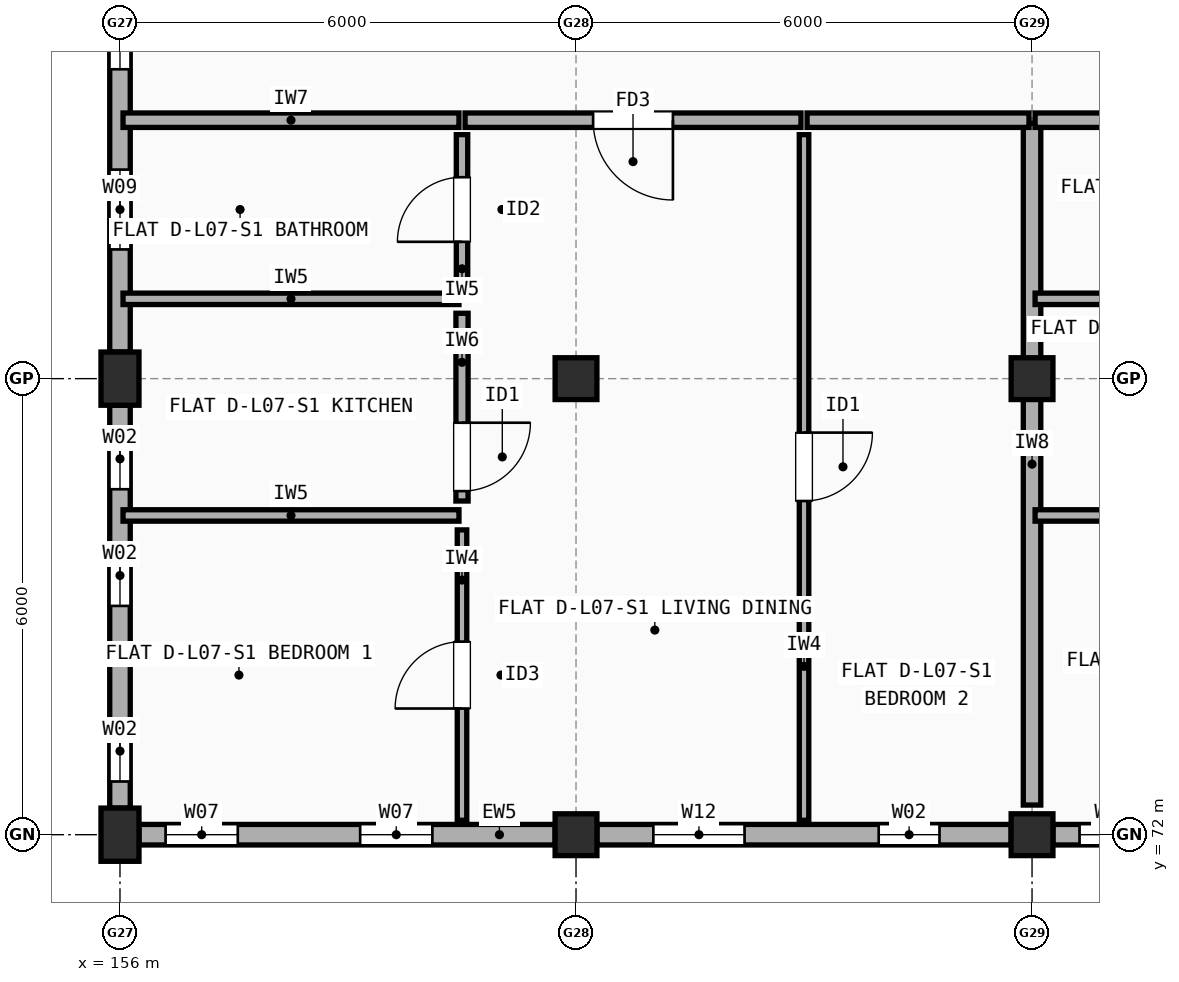
"""IFC4 building model, lengths in metres.
Left out: names, types, materials, properties, quantities, classifications, styles, units other than length and angle.
Written with IfcOpenShell. Run it as: python <this file> out.ifc"""

import sys

from ifc_helpers import new_model, si_unit, direction, frame, frame_2d, origin, origin_2d, place, context, subcontext, project, spatial, rectangle, extrude, element, fill, save


model = new_model("IFC4")
c1 = context("Model", 3, precision=1e-05, world=origin(), true_north=direction((0.0, 1.0)))
c2 = subcontext(c1, "Body", "Model", "MODEL_VIEW")
j1 = project(units=[si_unit("LENGTHUNIT", "METRE"), si_unit("PLANEANGLEUNIT", "RADIAN")], contexts=[c1])
p1 = place(None, origin())
s1 = spatial("IfcSite", under=j1, at=p1, CompositionType="ELEMENT")
p2 = place(p1, origin())
s2 = spatial("IfcBuilding", under=s1, at=p2, CompositionType="ELEMENT")
p3 = place(p2, frame((0.0, 0.0, 23.7)))
s3 = spatial("IfcBuildingStorey", under=s2, at=p3, CompositionType="ELEMENT", Elevation=23.7)
for number, where, z_axis, x_axis in (
    (1, (156.0, 72.0, 0.0), (0.0, 0.0, 1.0), (1.0, 0.0, 0.0)),
    (2, (156.0, 78.0, 0.0), (0.0, 0.0, 1.0), (1.0, 0.0, 0.0)),
):
    element("IfcColumn", number, at=place(p3, frame(where, z_axis=z_axis, x_axis=x_axis)), inside=s3, PredefinedType="COLUMN", context=c2, shape_type="SweptSolid", body=[
        extrude(rectangle(XDim=0.5, YDim=0.7, at=origin_2d()), origin(), (0.0, 0.0, 1.0), 2.975),
    ])
for number, where, z_axis, x_axis in (
    (3, (162.0, 72.0, 0.0), (0.0, 0.0, 1.0), (1.0, 0.0, 0.0)),
    (4, (162.0, 78.0, 0.0), (0.0, 0.0, 1.0), (1.0, 0.0, 0.0)),
    (5, (168.0, 72.0, 0.0), (0.0, 0.0, 1.0), (1.0, 0.0, 0.0)),
    (6, (168.0, 78.0, 0.0), (0.0, 0.0, 1.0), (1.0, 0.0, 0.0)),
):
    element("IfcColumn", number, at=place(p3, frame(where, z_axis=z_axis, x_axis=x_axis)), inside=s3, PredefinedType="COLUMN", context=c2, shape_type="SweptSolid", body=[
        extrude(rectangle(XDim=0.55, YDim=0.55, at=origin_2d()), origin(), (0.0, 0.0, 1.0), 2.975),
    ])
p4 = place(p3, frame((156.25, 72.0, 0.0), z_axis=(0.0, 0.0, 1.0), x_axis=(1.0, 0.0, 0.0)))
e7 = element("IfcWall", 7, at=p4, inside=s3, PredefinedType="STANDARD", context=c2, shape_type="SweptSolid", body=[
    extrude(rectangle(XDim=5.475, YDim=0.27, at=frame_2d((2.738, 0.0))), origin(), (0.0, 0.0, 1.0), 2.457),
])
p5 = place(p4, frame((0.35, 0.0, 0.9)))
e8 = element("IfcOpeningElement", 8, at=p5, cuts=e7, PredefinedType="OPENING", context=c2, shape_type="SweptSolid", body=[
    extrude(rectangle(XDim=0.95, YDim=1.35, at=frame_2d((0.475, 0.675))), frame((0.0, 0.145, 0.0), z_axis=(0.0, -1.0, 0.0), x_axis=(1.0, 0.0, 0.0)), (0.0, 0.0, 1.0), 0.29),
])
p6 = place(p4, frame((2.91, 0.0, 0.9)))
e9 = element("IfcOpeningElement", 9, at=p6, cuts=e7, PredefinedType="OPENING", context=c2, shape_type="SweptSolid", body=[
    extrude(rectangle(XDim=0.95, YDim=1.35, at=frame_2d((0.475, 0.675))), frame((0.0, 0.145, 0.0), z_axis=(0.0, -1.0, 0.0), x_axis=(1.0, 0.0, 0.0)), (0.0, 0.0, 1.0), 0.29),
])
p7 = place(p3, frame((162.275, 72.0, 0.0), z_axis=(0.0, 0.0, 1.0), x_axis=(1.0, 0.0, 0.0)))
e10 = element("IfcWall", 10, at=p7, inside=s3, PredefinedType="STANDARD", context=c2, shape_type="SweptSolid", body=[
    extrude(rectangle(XDim=5.45, YDim=0.27, at=frame_2d((2.725, 0.0))), origin(), (0.0, 0.0, 1.0), 2.457),
])
p8 = place(p7, frame((0.742, 0.0, 0.9)))
e11 = element("IfcOpeningElement", 11, at=p8, cuts=e10, PredefinedType="OPENING", context=c2, shape_type="SweptSolid", body=[
    extrude(rectangle(XDim=1.2, YDim=1.35, at=frame_2d((0.6, 0.675))), frame((0.0, 0.145, 0.0), z_axis=(0.0, -1.0, 0.0), x_axis=(1.0, 0.0, 0.0)), (0.0, 0.0, 1.0), 0.29),
])
p9 = place(p7, frame((3.708, 0.0, 0.9)))
e12 = element("IfcOpeningElement", 12, at=p9, cuts=e10, PredefinedType="OPENING", context=c2, shape_type="SweptSolid", body=[
    extrude(rectangle(XDim=0.8, YDim=1.2, at=frame_2d((0.4, 0.6))), frame((0.0, 0.145, 0.0), z_axis=(0.0, -1.0, 0.0), x_axis=(1.0, 0.0, 0.0)), (0.0, 0.0, 1.0), 0.29),
])
p10 = place(p3, frame((168.275, 72.0, 0.0), z_axis=(0.0, 0.0, 1.0), x_axis=(1.0, 0.0, 0.0)))
e13 = element("IfcWall", 13, at=p10, inside=s3, PredefinedType="STANDARD", context=c2, shape_type="SweptSolid", body=[
    extrude(rectangle(XDim=5.45, YDim=0.27, at=frame_2d((2.725, 0.0))), origin(), (0.0, 0.0, 1.0), 2.457),
])
p11 = place(p10, frame((0.35, 0.0, 0.9)))
e14 = element("IfcOpeningElement", 14, at=p11, cuts=e13, PredefinedType="OPENING", context=c2, shape_type="SweptSolid", body=[
    extrude(rectangle(XDim=0.85, YDim=1.25, at=frame_2d((0.425, 0.625))), frame((0.0, 0.145, 0.0), z_axis=(0.0, -1.0, 0.0), x_axis=(1.0, 0.0, 0.0)), (0.0, 0.0, 1.0), 0.29),
])
p12 = place(p10, frame((2.985, 0.0, 0.9)))
e15 = element("IfcOpeningElement", 15, at=p12, cuts=e13, PredefinedType="OPENING", context=c2, shape_type="SweptSolid", body=[
    extrude(rectangle(XDim=0.85, YDim=1.25, at=frame_2d((0.425, 0.625))), frame((0.0, 0.145, 0.0), z_axis=(0.0, -1.0, 0.0), x_axis=(1.0, 0.0, 0.0)), (0.0, 0.0, 1.0), 0.29),
])
p13 = place(p3, frame((156.0, 83.65, 0.0), z_axis=(0.0, 0.0, 1.0), x_axis=(0.0, -1.0, 0.0)))
e16 = element("IfcWall", 16, at=p13, inside=s3, PredefinedType="STANDARD", context=c2, shape_type="SweptSolid", body=[
    extrude(rectangle(XDim=5.3, YDim=0.27, at=frame_2d((2.65, 0.0))), origin(), (0.0, 0.0, 1.0), 2.457),
])
p14 = place(p13, frame((0.63, 0.0, 0.9)))
e17 = element("IfcOpeningElement", 17, at=p14, cuts=e16, PredefinedType="OPENING", context=c2, shape_type="SweptSolid", body=[
    extrude(rectangle(XDim=0.95, YDim=1.35, at=frame_2d((0.475, 0.675))), frame((0.0, 0.145, 0.0), z_axis=(0.0, -1.0, 0.0), x_axis=(1.0, 0.0, 0.0)), (0.0, 0.0, 1.0), 0.29),
])
p15 = place(p13, frame((2.9, 0.0, 0.9)))
e18 = element("IfcOpeningElement", 18, at=p15, cuts=e16, PredefinedType="OPENING", context=c2, shape_type="SweptSolid", body=[
    extrude(rectangle(XDim=1.05, YDim=1.35, at=frame_2d((0.525, 0.675))), frame((0.0, 0.145, 0.0), z_axis=(0.0, -1.0, 0.0), x_axis=(1.0, 0.0, 0.0)), (0.0, 0.0, 1.0), 0.29),
])
p16 = place(p3, frame((156.0, 77.65, 0.0), z_axis=(0.0, 0.0, 1.0), x_axis=(0.0, -1.0, 0.0)))
e19 = element("IfcWall", 19, at=p16, inside=s3, PredefinedType="STANDARD", context=c2, shape_type="SweptSolid", body=[
    extrude(rectangle(XDim=5.3, YDim=0.27, at=frame_2d((2.65, 0.0))), origin(), (0.0, 0.0, 1.0), 2.457),
])
p17 = place(p16, frame((0.305, 0.0, 0.9)))
e20 = element("IfcOpeningElement", 20, at=p17, cuts=e19, PredefinedType="OPENING", context=c2, shape_type="SweptSolid", body=[
    extrude(rectangle(XDim=0.8, YDim=1.2, at=frame_2d((0.4, 0.6))), frame((0.0, 0.145, 0.0), z_axis=(0.0, -1.0, 0.0), x_axis=(1.0, 0.0, 0.0)), (0.0, 0.0, 1.0), 0.29),
])
p18 = place(p16, frame((1.84, 0.0, 0.9)))
e21 = element("IfcOpeningElement", 21, at=p18, cuts=e19, PredefinedType="OPENING", context=c2, shape_type="SweptSolid", body=[
    extrude(rectangle(XDim=0.8, YDim=1.2, at=frame_2d((0.4, 0.6))), frame((0.0, 0.145, 0.0), z_axis=(0.0, -1.0, 0.0), x_axis=(1.0, 0.0, 0.0)), (0.0, 0.0, 1.0), 0.29),
])
p19 = place(p16, frame((4.15, 0.0, 0.9)))
e22 = element("IfcOpeningElement", 22, at=p19, cuts=e19, PredefinedType="OPENING", context=c2, shape_type="SweptSolid", body=[
    extrude(rectangle(XDim=0.8, YDim=1.2, at=frame_2d((0.4, 0.6))), frame((0.0, 0.145, 0.0), z_axis=(0.0, -1.0, 0.0), x_axis=(1.0, 0.0, 0.0)), (0.0, 0.0, 1.0), 0.29),
])
p20 = place(p3, frame((168.0, 72.39, 0.0), z_axis=(0.0, 0.0, 1.0), x_axis=(0.0, 1.0, 0.0)))
e23 = element("IfcWall", 23, at=p20, inside=s3, PredefinedType="SOLIDWALL", context=c2, shape_type="SweptSolid", body=[
    extrude(rectangle(XDim=8.97, YDim=0.23, at=frame_2d((4.485, 0.0))), origin(), (0.0, 0.0, 1.0), 2.508),
])
p21 = place(p3, frame((156.04, 81.4, 0.0), z_axis=(0.0, 0.0, 1.0), x_axis=(1.0, 0.0, 0.0)))
e24 = element("IfcWall", 24, at=p21, inside=s3, PredefinedType="SOLIDWALL", context=c2, shape_type="SweptSolid", body=[
    extrude(rectangle(XDim=4.42, YDim=0.19, at=frame_2d((2.21, 0.0))), origin(), (0.0, 0.0, 1.0), 2.457),
])
p22 = place(p3, frame((160.54, 81.4, 0.0), z_axis=(0.0, 0.0, 1.0), x_axis=(1.0, 0.0, 0.0)))
e25 = element("IfcWall", 25, at=p22, inside=s3, PredefinedType="SOLIDWALL", context=c2, shape_type="SweptSolid", body=[
    extrude(rectangle(XDim=4.42, YDim=0.19, at=frame_2d((2.21, 0.0))), origin(), (0.0, 0.0, 1.0), 2.508),
])
p23 = place(p22, frame((1.685, 0.0, 0.0)))
e26 = element("IfcOpeningElement", 26, at=p23, cuts=e25, PredefinedType="OPENING", context=c2, shape_type="SweptSolid", body=[
    extrude(rectangle(XDim=1.05, YDim=2.15, at=frame_2d((0.525, 1.075))), frame((0.0, 0.105, 0.0), z_axis=(0.0, -1.0, 0.0), x_axis=(1.0, 0.0, 0.0)), (0.0, 0.0, 1.0), 0.21),
])
p24 = place(p3, frame((160.5, 72.19, 0.0), z_axis=(0.0, 0.0, 1.0), x_axis=(0.0, 1.0, 0.0)))
e27 = element("IfcWall", 27, at=p24, inside=s3, PredefinedType="PARTITIONING", context=c2, shape_type="SweptSolid", body=[
    extrude(rectangle(XDim=3.82, YDim=0.125, at=frame_2d((1.91, 0.0))), origin(), (0.0, 0.0, 1.0), 2.975),
])
p25 = place(p24, frame((1.47, 0.0, 0.0)))
e28 = element("IfcOpeningElement", 28, at=p25, cuts=e27, PredefinedType="OPENING", context=c2, shape_type="SweptSolid", body=[
    extrude(rectangle(XDim=0.88, YDim=2.1, at=frame_2d((0.44, 1.05))), frame((0.0, 0.073, 0.0), z_axis=(0.0, -1.0, 0.0), x_axis=(1.0, 0.0, 0.0)), (0.0, 0.0, 1.0), 0.145),
])
p26 = place(p3, frame((160.5, 76.39, 0.0), z_axis=(0.0, 0.0, 1.0), x_axis=(0.0, 1.0, 0.0)))
e29 = element("IfcWall", 29, at=p26, inside=s3, PredefinedType="PLUMBINGWALL", context=c2, shape_type="SweptSolid", body=[
    extrude(rectangle(XDim=2.47, YDim=0.16, at=frame_2d((1.235, 0.0))), origin(), (0.0, 0.0, 1.0), 2.457),
])
p27 = place(p26, frame((0.13, 0.0, 0.0)))
e30 = element("IfcOpeningElement", 30, at=p27, cuts=e29, PredefinedType="OPENING", context=c2, shape_type="SweptSolid", body=[
    extrude(rectangle(XDim=0.9, YDim=2.1, at=frame_2d((0.45, 1.05))), frame((0.0, 0.09, 0.0), z_axis=(0.0, -1.0, 0.0), x_axis=(1.0, 0.0, 0.0)), (0.0, 0.0, 1.0), 0.18),
])
p28 = place(p3, frame((160.5, 79.24, 0.0), z_axis=(0.0, 0.0, 1.0), x_axis=(0.0, 1.0, 0.0)))
e31 = element("IfcWall", 31, at=p28, inside=s3, PredefinedType="PARTITIONING", context=c2, shape_type="SweptSolid", body=[
    extrude(rectangle(XDim=1.97, YDim=0.15, at=frame_2d((0.985, 0.0))), origin(), (0.0, 0.0, 1.0), 2.975),
])
p29 = place(p28, frame((0.56, 0.0, 0.0)))
e32 = element("IfcOpeningElement", 32, at=p29, cuts=e31, PredefinedType="OPENING", context=c2, shape_type="SweptSolid", body=[
    extrude(rectangle(XDim=0.85, YDim=2.1, at=frame_2d((0.425, 1.05))), frame((0.0, 0.085, 0.0), z_axis=(0.0, -1.0, 0.0), x_axis=(1.0, 0.0, 0.0)), (0.0, 0.0, 1.0), 0.17),
])
for number, where, z_axis, x_axis in (
    (33, (156.04, 76.2, 0.0), (0.0, 0.0, 1.0), (1.0, 0.0, 0.0)),
    (34, (156.04, 79.05, 0.0), (0.0, 0.0, 1.0), (1.0, 0.0, 0.0)),
):
    element("IfcWall", number, at=place(p3, frame(where, z_axis=z_axis, x_axis=x_axis)), inside=s3, PredefinedType="PARTITIONING", context=c2, shape_type="SweptSolid", body=[
        extrude(rectangle(XDim=4.42, YDim=0.15, at=frame_2d((2.21, 0.0))), origin(), (0.0, 0.0, 1.0), 2.457),
    ])
p30 = place(p3, frame((165.04, 81.4, 0.0), z_axis=(0.0, 0.0, 1.0), x_axis=(1.0, 0.0, 0.0)))
e35 = element("IfcWall", 35, at=p30, inside=s3, PredefinedType="SOLIDWALL", context=c2, shape_type="SweptSolid", body=[
    extrude(rectangle(XDim=2.92, YDim=0.19, at=frame_2d((1.46, 0.0))), origin(), (0.0, 0.0, 1.0), 2.508),
])
p31 = place(p3, frame((165.0, 72.19, 0.0), z_axis=(0.0, 0.0, 1.0), x_axis=(0.0, 1.0, 0.0)))
e36 = element("IfcWall", 36, at=p31, inside=s3, PredefinedType="PARTITIONING", context=c2, shape_type="SweptSolid", body=[
    extrude(rectangle(XDim=9.02, YDim=0.125, at=frame_2d((4.51, 0.0))), origin(), (0.0, 0.0, 1.0), 2.457),
])
p32 = place(p31, frame((4.2, 0.0, 0.0)))
e37 = element("IfcOpeningElement", 37, at=p32, cuts=e36, PredefinedType="OPENING", context=c2, shape_type="SweptSolid", body=[
    extrude(rectangle(XDim=0.9, YDim=2.1, at=frame_2d((0.45, 1.05))), frame((0.0, 0.073, 0.0), z_axis=(0.0, -1.0, 0.0), x_axis=(1.0, 0.0, 0.0)), (0.0, 0.0, 1.0), 0.145),
])
p33 = place(p3, frame((168.04, 81.4, 0.0), z_axis=(0.0, 0.0, 1.0), x_axis=(1.0, 0.0, 0.0)))
e38 = element("IfcWall", 38, at=p33, inside=s3, PredefinedType="SOLIDWALL", context=c2, shape_type="SweptSolid", body=[
    extrude(rectangle(XDim=4.42, YDim=0.19, at=frame_2d((2.21, 0.0))), origin(), (0.0, 0.0, 1.0), 2.508),
])
p34 = place(p3, frame((168.04, 76.2, 0.0), z_axis=(0.0, 0.0, 1.0), x_axis=(1.0, 0.0, 0.0)))
e39 = element("IfcWall", 39, at=p34, inside=s3, PredefinedType="PARTITIONING", context=c2, shape_type="SweptSolid", body=[
    extrude(rectangle(XDim=4.42, YDim=0.15, at=frame_2d((2.21, 0.0))), origin(), (0.0, 0.0, 1.0), 2.548),
])
p35 = place(p3, frame((168.04, 79.05, 0.0), z_axis=(0.0, 0.0, 1.0), x_axis=(1.0, 0.0, 0.0)))
e40 = element("IfcWall", 40, at=p35, inside=s3, PredefinedType="PARTITIONING", context=c2, shape_type="SweptSolid", body=[
    extrude(rectangle(XDim=4.42, YDim=0.15, at=frame_2d((2.21, 0.0))), origin(), (0.0, 0.0, 1.0), 2.508),
])
p36 = place(p5, origin())
e41 = element("IfcWindow", 41, at=p36, inside=s3, PartitioningType="SINGLE_PANEL", PredefinedType="WINDOW", context=c2, shape_type="SweptSolid", body=[
    extrude(rectangle(XDim=0.95, YDim=1.35, at=frame_2d((0.475, 0.675))), frame((0.0, 0.03, 0.0), z_axis=(0.0, -1.0, 0.0), x_axis=(1.0, 0.0, 0.0)), (0.0, 0.0, 1.0), 0.06),
])
fill(e8, e41)
p37 = place(p6, origin())
e42 = element("IfcWindow", 42, at=p37, inside=s3, PartitioningType="SINGLE_PANEL", PredefinedType="WINDOW", context=c2, shape_type="SweptSolid", body=[
    extrude(rectangle(XDim=0.95, YDim=1.35, at=frame_2d((0.475, 0.675))), frame((0.0, 0.03, 0.0), z_axis=(0.0, -1.0, 0.0), x_axis=(1.0, 0.0, 0.0)), (0.0, 0.0, 1.0), 0.06),
])
fill(e9, e42)
p38 = place(p8, origin())
e43 = element("IfcWindow", 43, at=p38, inside=s3, PartitioningType="SINGLE_PANEL", PredefinedType="WINDOW", context=c2, shape_type="SweptSolid", body=[
    extrude(rectangle(XDim=1.2, YDim=1.35, at=frame_2d((0.6, 0.675))), frame((0.0, 0.03, 0.0), z_axis=(0.0, -1.0, 0.0), x_axis=(1.0, 0.0, 0.0)), (0.0, 0.0, 1.0), 0.06),
])
fill(e11, e43)
p39 = place(p9, origin())
e44 = element("IfcWindow", 44, at=p39, inside=s3, PartitioningType="SINGLE_PANEL", PredefinedType="WINDOW", context=c2, shape_type="SweptSolid", body=[
    extrude(rectangle(XDim=0.8, YDim=1.2, at=frame_2d((0.4, 0.6))), frame((0.0, 0.03, 0.0), z_axis=(0.0, -1.0, 0.0), x_axis=(1.0, 0.0, 0.0)), (0.0, 0.0, 1.0), 0.06),
])
fill(e12, e44)
p40 = place(p11, origin())
e45 = element("IfcWindow", 45, at=p40, inside=s3, PartitioningType="SINGLE_PANEL", PredefinedType="WINDOW", context=c2, shape_type="SweptSolid", body=[
    extrude(rectangle(XDim=0.85, YDim=1.25, at=frame_2d((0.425, 0.625))), frame((0.0, 0.03, 0.0), z_axis=(0.0, -1.0, 0.0), x_axis=(1.0, 0.0, 0.0)), (0.0, 0.0, 1.0), 0.06),
])
fill(e14, e45)
p41 = place(p14, origin())
e46 = element("IfcWindow", 46, at=p41, inside=s3, PartitioningType="SINGLE_PANEL", PredefinedType="WINDOW", context=c2, shape_type="SweptSolid", body=[
    extrude(rectangle(XDim=0.95, YDim=1.35, at=frame_2d((0.475, 0.675))), frame((0.0, 0.03, 0.0), z_axis=(0.0, -1.0, 0.0), x_axis=(1.0, 0.0, 0.0)), (0.0, 0.0, 1.0), 0.06),
])
fill(e17, e46)
p42 = place(p15, origin())
e47 = element("IfcWindow", 47, at=p42, inside=s3, PartitioningType="SINGLE_PANEL", PredefinedType="WINDOW", context=c2, shape_type="SweptSolid", body=[
    extrude(rectangle(XDim=1.05, YDim=1.35, at=frame_2d((0.525, 0.675))), frame((0.0, 0.03, 0.0), z_axis=(0.0, -1.0, 0.0), x_axis=(1.0, 0.0, 0.0)), (0.0, 0.0, 1.0), 0.06),
])
fill(e18, e47)
p43 = place(p17, origin())
e48 = element("IfcWindow", 48, at=p43, inside=s3, PartitioningType="SINGLE_PANEL", PredefinedType="WINDOW", context=c2, shape_type="SweptSolid", body=[
    extrude(rectangle(XDim=0.8, YDim=1.2, at=frame_2d((0.4, 0.6))), frame((0.0, 0.03, 0.0), z_axis=(0.0, -1.0, 0.0), x_axis=(1.0, 0.0, 0.0)), (0.0, 0.0, 1.0), 0.06),
])
fill(e20, e48)
p44 = place(p18, origin())
e49 = element("IfcWindow", 49, at=p44, inside=s3, PartitioningType="SINGLE_PANEL", PredefinedType="WINDOW", context=c2, shape_type="SweptSolid", body=[
    extrude(rectangle(XDim=0.8, YDim=1.2, at=frame_2d((0.4, 0.6))), frame((0.0, 0.03, 0.0), z_axis=(0.0, -1.0, 0.0), x_axis=(1.0, 0.0, 0.0)), (0.0, 0.0, 1.0), 0.06),
])
fill(e21, e49)
p45 = place(p19, origin())
e50 = element("IfcWindow", 50, at=p45, inside=s3, PartitioningType="SINGLE_PANEL", PredefinedType="WINDOW", context=c2, shape_type="SweptSolid", body=[
    extrude(rectangle(XDim=0.8, YDim=1.2, at=frame_2d((0.4, 0.6))), frame((0.0, 0.03, 0.0), z_axis=(0.0, -1.0, 0.0), x_axis=(1.0, 0.0, 0.0)), (0.0, 0.0, 1.0), 0.06),
])
fill(e22, e50)
p46 = place(p23, origin())
e51 = element("IfcDoor", 51, at=p46, inside=s3, OperationType="SINGLE_SWING_RIGHT", PredefinedType="DOOR", context=c2, shape_type="SweptSolid", body=[
    extrude(rectangle(XDim=1.05, YDim=2.15, at=frame_2d((0.525, 1.075))), frame((0.0, 0.025, 0.0), z_axis=(0.0, -1.0, 0.0), x_axis=(1.0, 0.0, 0.0)), (0.0, 0.0, 1.0), 0.05),
])
fill(e26, e51)
p47 = place(p25, origin())
e52 = element("IfcDoor", 52, at=p47, inside=s3, OperationType="SINGLE_SWING_LEFT", PredefinedType="DOOR", context=c2, shape_type="SweptSolid", body=[
    extrude(rectangle(XDim=0.88, YDim=2.1, at=frame_2d((0.44, 1.05))), frame((0.0, 0.025, 0.0), z_axis=(0.0, -1.0, 0.0), x_axis=(1.0, 0.0, 0.0)), (0.0, 0.0, 1.0), 0.05),
])
fill(e28, e52)
p48 = place(p27, origin())
e53 = element("IfcDoor", 53, at=p48, inside=s3, OperationType="SINGLE_SWING_RIGHT", PredefinedType="DOOR", context=c2, shape_type="SweptSolid", body=[
    extrude(rectangle(XDim=0.9, YDim=2.1, at=frame_2d((0.45, 1.05))), frame((0.0, 0.025, 0.0), z_axis=(0.0, -1.0, 0.0), x_axis=(1.0, 0.0, 0.0)), (0.0, 0.0, 1.0), 0.05),
])
fill(e30, e53)
p49 = place(p29, origin())
e54 = element("IfcDoor", 54, at=p49, inside=s3, OperationType="SINGLE_SWING_LEFT", PredefinedType="DOOR", context=c2, shape_type="SweptSolid", body=[
    extrude(rectangle(XDim=0.85, YDim=2.1, at=frame_2d((0.425, 1.05))), frame((0.0, 0.025, 0.0), z_axis=(0.0, -1.0, 0.0), x_axis=(1.0, 0.0, 0.0)), (0.0, 0.0, 1.0), 0.05),
])
fill(e32, e54)
p50 = place(p32, origin())
e55 = element("IfcDoor", 55, at=p50, inside=s3, OperationType="SINGLE_SWING_RIGHT", PredefinedType="DOOR", context=c2, shape_type="SweptSolid", body=[
    extrude(rectangle(XDim=0.9, YDim=2.1, at=frame_2d((0.45, 1.05))), frame((0.0, 0.025, 0.0), z_axis=(0.0, -1.0, 0.0), x_axis=(1.0, 0.0, 0.0)), (0.0, 0.0, 1.0), 0.05),
])
fill(e37, e55)
save(model, sys.argv[1])
